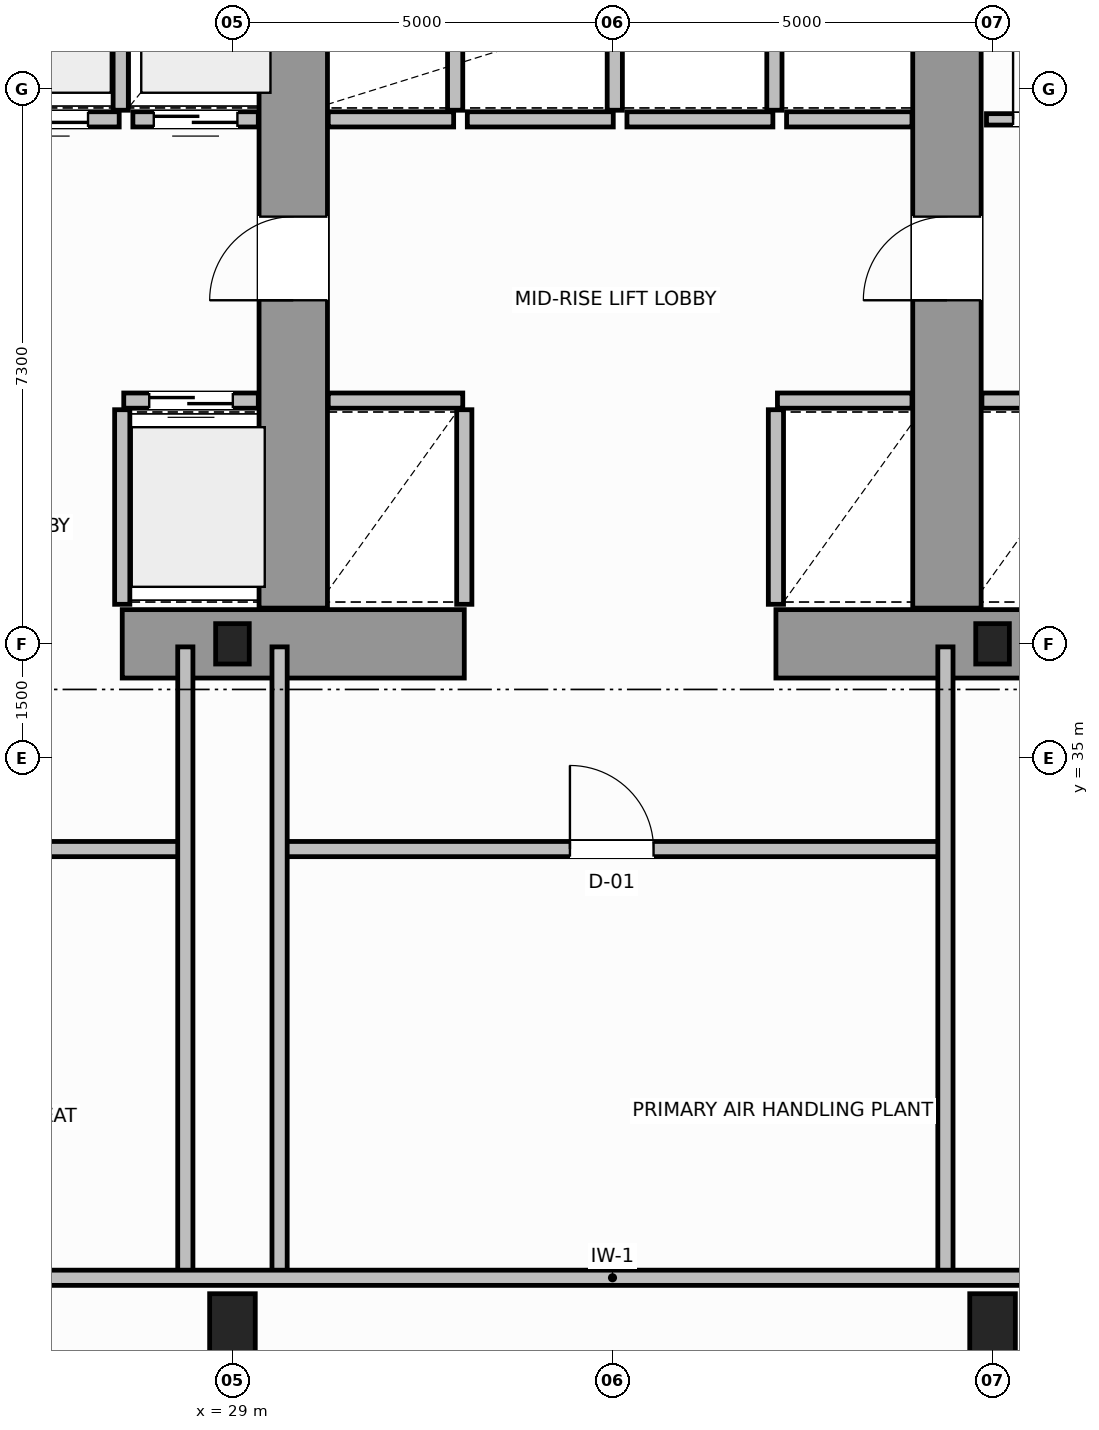
"""IFC4 building model, lengths in metres.
Left out: names, types, materials, properties, quantities, classifications, styles, units other than length and angle.
Written with IfcOpenShell. Run it as: python <this file> out.ifc"""

import sys

from ifc_helpers import new_model, si_unit, direction, frame, frame_2d, origin, origin_2d, place, context, subcontext, project, spatial, rectangle, hollow_rectangle, i_section, extrude, source, transform, mapped, element, fill, save


model = new_model("IFC4")
c1 = context("Model", 3, precision=1e-05, world=origin(), true_north=direction((0.0, 1.0)))
c2 = subcontext(c1, "Body", "Model", "MODEL_VIEW")
j1 = project(units=[si_unit("LENGTHUNIT", "METRE"), si_unit("PLANEANGLEUNIT", "RADIAN")], contexts=[c1])
p1 = place(None, origin())
s1 = spatial("IfcSite", under=j1, at=p1, CompositionType="ELEMENT")
p2 = place(p1, origin())
s2 = spatial("IfcBuilding", under=s1, at=p2, CompositionType="ELEMENT")
p3 = place(p2, frame((0.0, 0.0, 83.4)))
s3 = spatial("IfcBuildingStorey", under=s2, at=p3, CompositionType="ELEMENT", Elevation=83.4)
m1 = source(origin(), c2, "Body", "SweptSolid", [
    extrude(i_section(OverallWidth=0.442, OverallDepth=0.531, WebThickness=0.065, FlangeThickness=0.076, FilletRadius=0.015, at=origin_2d()), origin(), (0.0, 0.0, 1.0), 4.8),
])
for number, where, z_axis, x_axis in (
    (1, (29.0, 36.5, 0.0), (0.0, 0.0, 1.0), (1.0, 0.0, 0.0)),
    (2, (39.0, 36.5, 0.0), (0.0, 0.0, 1.0), (1.0, 0.0, 0.0)),
):
    element("IfcColumn", number, at=place(p3, frame(where, z_axis=z_axis, x_axis=x_axis)), inside=s3, PredefinedType="COLUMN", context=c2, shape_type="MappedRepresentation", body=[
        mapped(m1, transform((0.0, 0.0, 0.0), scale=1.0)),
    ])
m2 = source(origin(), c2, "Body", "SweptSolid", [
    extrude(hollow_rectangle(XDim=0.6, YDim=0.9, WallThickness=0.04, InnerFilletRadius=0.04, OuterFilletRadius=0.08, at=origin_2d()), origin(), (0.0, 0.0, 1.0), 4.8),
])
for number, where, z_axis, x_axis in (
    (3, (29.0, 27.5, 0.0), (0.0, 0.0, 1.0), (1.0, 0.0, 0.0)),
    (4, (39.0, 27.5, 0.0), (0.0, 0.0, 1.0), (1.0, 0.0, 0.0)),
):
    element("IfcColumn", number, at=place(p3, frame(where, z_axis=z_axis, x_axis=x_axis)), inside=s3, PredefinedType="COLUMN", context=c2, shape_type="MappedRepresentation", body=[
        mapped(m2, transform((0.0, 0.0, 0.0), scale=1.0)),
    ])
for number, where, z_axis, x_axis in (
    (5, (27.55, 36.5, 0.0), (0.0, 0.0, 1.0), (1.0, 0.0, 0.0)),
    (6, (36.15, 36.5, 0.0), (0.0, 0.0, 1.0), (1.0, 0.0, 0.0)),
):
    element("IfcWall", number, at=place(p3, frame(where, z_axis=z_axis, x_axis=x_axis)), inside=s3, PredefinedType="SHEAR", context=c2, shape_type="SweptSolid", body=[
        extrude(rectangle(XDim=4.5, YDim=0.9, at=frame_2d((2.25, 0.0))), origin(), (0.0, 0.0, 1.0), 4.8),
    ])
p4 = place(p3, frame((29.8, 36.97, 0.0), z_axis=(0.0, 0.0, 1.0), x_axis=(0.0, 1.0, 0.0)))
e7 = element("IfcWall", 7, at=p4, inside=s3, PredefinedType="SHEAR", context=c2, shape_type="SweptSolid", body=[
    extrude(rectangle(XDim=9.23, YDim=0.9, at=frame_2d((4.615, 0.0))), origin(), (0.0, 0.0, 1.0), 4.8),
])
p5 = place(p4, frame((4.05, 0.0, 0.0)))
e8 = element("IfcOpeningElement", 8, at=p5, cuts=e7, PredefinedType="OPENING", context=c2, shape_type="SweptSolid", body=[
    extrude(rectangle(XDim=1.1, YDim=2.15, at=frame_2d((0.55, 1.075))), frame((0.0, 0.46, 0.0), z_axis=(0.0, -1.0, 0.0), x_axis=(1.0, 0.0, 0.0)), (0.0, 0.0, 1.0), 0.92),
])
p6 = place(p3, frame((38.4, 36.97, 0.0), z_axis=(0.0, 0.0, 1.0), x_axis=(0.0, 1.0, 0.0)))
e9 = element("IfcWall", 9, at=p6, inside=s3, PredefinedType="SHEAR", context=c2, shape_type="SweptSolid", body=[
    extrude(rectangle(XDim=9.23, YDim=0.9, at=frame_2d((4.615, 0.0))), origin(), (0.0, 0.0, 1.0), 4.8),
])
p7 = place(p6, frame((4.05, 0.0, 0.0)))
e10 = element("IfcOpeningElement", 10, at=p7, cuts=e9, PredefinedType="OPENING", context=c2, shape_type="SweptSolid", body=[
    extrude(rectangle(XDim=1.1, YDim=2.15, at=frame_2d((0.55, 1.075))), frame((0.0, 0.46, 0.0), z_axis=(0.0, -1.0, 0.0), x_axis=(1.0, 0.0, 0.0)), (0.0, 0.0, 1.0), 0.92),
])
p8 = place(p3, frame((27.57, 39.7, 0.0), z_axis=(0.0, 0.0, 1.0), x_axis=(1.0, 0.0, 0.0)))
e11 = element("IfcWall", 11, at=p8, inside=s3, PredefinedType="SOLIDWALL", context=c2, shape_type="SweptSolid", body=[
    extrude(rectangle(XDim=1.77, YDim=0.2, at=frame_2d((0.885, 0.0))), origin(), (0.0, 0.0, 1.0), 4.54),
])
p9 = place(p8, frame((0.335, 0.0, 0.0)))
e12 = element("IfcOpeningElement", 12, at=p9, cuts=e11, PredefinedType="OPENING", context=c2, shape_type="SweptSolid", body=[
    extrude(rectangle(XDim=1.1, YDim=2.15, at=frame_2d((0.55, 1.075))), frame((0.0, 0.11, 0.0), z_axis=(0.0, -1.0, 0.0), x_axis=(1.0, 0.0, 0.0)), (0.0, 0.0, 1.0), 0.22),
])
p10 = place(p3, frame((27.55, 37.02, 0.0), z_axis=(0.0, 0.0, 1.0), x_axis=(0.0, 1.0, 0.0)))
e13 = element("IfcWall", 13, at=p10, inside=s3, PredefinedType="SOLIDWALL", context=c2, shape_type="SweptSolid", body=[
    extrude(rectangle(XDim=2.56, YDim=0.2, at=frame_2d((1.28, 0.0))), origin(), (0.0, 0.0, 1.0), 4.54),
])
p11 = place(p3, frame((25.59, 43.4, 0.0), z_axis=(0.0, 0.0, 1.0), x_axis=(1.0, 0.0, 0.0)))
e14 = element("IfcWall", 14, at=p11, inside=s3, PredefinedType="SOLIDWALL", context=c2, shape_type="SweptSolid", body=[
    extrude(rectangle(XDim=1.92, YDim=0.2, at=frame_2d((0.96, 0.0))), origin(), (0.0, 0.0, 1.0), 4.54),
])
p12 = place(p11, frame((0.41, 0.0, 0.0)))
e15 = element("IfcOpeningElement", 15, at=p12, cuts=e14, PredefinedType="OPENING", context=c2, shape_type="SweptSolid", body=[
    extrude(rectangle(XDim=1.1, YDim=2.15, at=frame_2d((0.55, 1.075))), frame((0.0, 0.11, 0.0), z_axis=(0.0, -1.0, 0.0), x_axis=(1.0, 0.0, 0.0)), (0.0, 0.0, 1.0), 0.22),
])
p13 = place(p3, frame((27.53, 43.52, 0.0), z_axis=(0.0, 0.0, 1.0), x_axis=(0.0, 1.0, 0.0)))
e16 = element("IfcWall", 16, at=p13, inside=s3, PredefinedType="SOLIDWALL", context=c2, shape_type="SweptSolid", body=[
    extrude(rectangle(XDim=2.56, YDim=0.2, at=frame_2d((1.28, 0.0))), origin(), (0.0, 0.0, 1.0), 4.54),
])
p14 = place(p3, frame((27.69, 43.4, 0.0), z_axis=(0.0, 0.0, 1.0), x_axis=(1.0, 0.0, 0.0)))
e17 = element("IfcWall", 17, at=p14, inside=s3, PredefinedType="SOLIDWALL", context=c2, shape_type="SweptSolid", body=[
    extrude(rectangle(XDim=1.65, YDim=0.2, at=frame_2d((0.825, 0.0))), origin(), (0.0, 0.0, 1.0), 4.54),
])
p15 = place(p14, frame((0.275, 0.0, 0.0)))
e18 = element("IfcOpeningElement", 18, at=p15, cuts=e17, PredefinedType="OPENING", context=c2, shape_type="SweptSolid", body=[
    extrude(rectangle(XDim=1.1, YDim=2.15, at=frame_2d((0.55, 1.075))), frame((0.0, 0.11, 0.0), z_axis=(0.0, -1.0, 0.0), x_axis=(1.0, 0.0, 0.0)), (0.0, 0.0, 1.0), 0.22),
])
p16 = place(p3, frame((30.26, 39.7, 0.0), z_axis=(0.0, 0.0, 1.0), x_axis=(1.0, 0.0, 0.0)))
e19 = element("IfcWall", 19, at=p16, inside=s3, PredefinedType="SOLIDWALL", context=c2, shape_type="SweptSolid", body=[
    extrude(rectangle(XDim=1.77, YDim=0.2, at=frame_2d((0.885, 0.0))), origin(), (0.0, 0.0, 1.0), 4.54),
])
p17 = place(p3, frame((32.05, 37.02, 0.0), z_axis=(0.0, 0.0, 1.0), x_axis=(0.0, 1.0, 0.0)))
e20 = element("IfcWall", 20, at=p17, inside=s3, PredefinedType="SOLIDWALL", context=c2, shape_type="SweptSolid", body=[
    extrude(rectangle(XDim=2.56, YDim=0.2, at=frame_2d((1.28, 0.0))), origin(), (0.0, 0.0, 1.0), 4.54),
])
p18 = place(p3, frame((36.17, 39.7, 0.0), z_axis=(0.0, 0.0, 1.0), x_axis=(1.0, 0.0, 0.0)))
e21 = element("IfcWall", 21, at=p18, inside=s3, PredefinedType="SOLIDWALL", context=c2, shape_type="SweptSolid", body=[
    extrude(rectangle(XDim=1.77, YDim=0.2, at=frame_2d((0.885, 0.0))), origin(), (0.0, 0.0, 1.0), 4.54),
])
p19 = place(p3, frame((36.15, 37.02, 0.0), z_axis=(0.0, 0.0, 1.0), x_axis=(0.0, 1.0, 0.0)))
e22 = element("IfcWall", 22, at=p19, inside=s3, PredefinedType="SOLIDWALL", context=c2, shape_type="SweptSolid", body=[
    extrude(rectangle(XDim=2.56, YDim=0.2, at=frame_2d((1.28, 0.0))), origin(), (0.0, 0.0, 1.0), 4.54),
])
p20 = place(p3, frame((30.26, 43.4, 0.0), z_axis=(0.0, 0.0, 1.0), x_axis=(1.0, 0.0, 0.0)))
e23 = element("IfcWall", 23, at=p20, inside=s3, PredefinedType="SOLIDWALL", context=c2, shape_type="SweptSolid", body=[
    extrude(rectangle(XDim=1.65, YDim=0.2, at=frame_2d((0.825, 0.0))), origin(), (0.0, 0.0, 1.0), 4.54),
])
p21 = place(p3, frame((31.93, 43.52, 0.0), z_axis=(0.0, 0.0, 1.0), x_axis=(0.0, 1.0, 0.0)))
e24 = element("IfcWall", 24, at=p21, inside=s3, PredefinedType="SOLIDWALL", context=c2, shape_type="SweptSolid", body=[
    extrude(rectangle(XDim=2.56, YDim=0.2, at=frame_2d((1.28, 0.0))), origin(), (0.0, 0.0, 1.0), 4.54),
])
p22 = place(p3, frame((32.09, 43.4, 0.0), z_axis=(0.0, 0.0, 1.0), x_axis=(1.0, 0.0, 0.0)))
e25 = element("IfcWall", 25, at=p22, inside=s3, PredefinedType="SOLIDWALL", context=c2, shape_type="SweptSolid", body=[
    extrude(rectangle(XDim=1.92, YDim=0.2, at=frame_2d((0.96, 0.0))), origin(), (0.0, 0.0, 1.0), 4.54),
])
p23 = place(p3, frame((34.03, 43.52, 0.0), z_axis=(0.0, 0.0, 1.0), x_axis=(0.0, 1.0, 0.0)))
e26 = element("IfcWall", 26, at=p23, inside=s3, PredefinedType="SOLIDWALL", context=c2, shape_type="SweptSolid", body=[
    extrude(rectangle(XDim=2.56, YDim=0.2, at=frame_2d((1.28, 0.0))), origin(), (0.0, 0.0, 1.0), 4.54),
])
p24 = place(p3, frame((34.19, 43.4, 0.0), z_axis=(0.0, 0.0, 1.0), x_axis=(1.0, 0.0, 0.0)))
e27 = element("IfcWall", 27, at=p24, inside=s3, PredefinedType="SOLIDWALL", context=c2, shape_type="SweptSolid", body=[
    extrude(rectangle(XDim=1.92, YDim=0.2, at=frame_2d((0.96, 0.0))), origin(), (0.0, 0.0, 1.0), 4.54),
])
p25 = place(p3, frame((36.13, 43.52, 0.0), z_axis=(0.0, 0.0, 1.0), x_axis=(0.0, 1.0, 0.0)))
e28 = element("IfcWall", 28, at=p25, inside=s3, PredefinedType="SOLIDWALL", context=c2, shape_type="SweptSolid", body=[
    extrude(rectangle(XDim=2.56, YDim=0.2, at=frame_2d((1.28, 0.0))), origin(), (0.0, 0.0, 1.0), 4.54),
])
p26 = place(p3, frame((36.29, 43.4, 0.0), z_axis=(0.0, 0.0, 1.0), x_axis=(1.0, 0.0, 0.0)))
e29 = element("IfcWall", 29, at=p26, inside=s3, PredefinedType="SOLIDWALL", context=c2, shape_type="SweptSolid", body=[
    extrude(rectangle(XDim=1.65, YDim=0.2, at=frame_2d((0.825, 0.0))), origin(), (0.0, 0.0, 1.0), 4.54),
])
p27 = place(p3, frame((38.86, 39.7, 0.0), z_axis=(0.0, 0.0, 1.0), x_axis=(1.0, 0.0, 0.0)))
e30 = element("IfcWall", 30, at=p27, inside=s3, PredefinedType="SOLIDWALL", context=c2, shape_type="SweptSolid", body=[
    extrude(rectangle(XDim=1.77, YDim=0.2, at=frame_2d((0.885, 0.0))), origin(), (0.0, 0.0, 1.0), 4.54),
])
p28 = place(p3, frame((38.92, 43.4, 0.0), z_axis=(0.0, 0.0, 1.0), x_axis=(1.0, 0.0, 0.0)))
e31 = element("IfcWall", 31, at=p28, inside=s3, PredefinedType="PARTITIONING", context=c2, shape_type="SweptSolid", body=[
    extrude(rectangle(XDim=1.6, YDim=0.15, at=frame_2d((0.8, 0.0))), origin(), (0.0, 0.0, 1.0), 4.54),
])
p29 = place(p28, frame((0.35, 0.0, 0.0)))
e32 = element("IfcOpeningElement", 32, at=p29, cuts=e31, PredefinedType="OPENING", context=c2, shape_type="SweptSolid", body=[
    extrude(rectangle(XDim=0.9, YDim=2.1, at=frame_2d((0.45, 1.05))), frame((0.0, 0.085, 0.0), z_axis=(0.0, -1.0, 0.0), x_axis=(1.0, 0.0, 0.0)), (0.0, 0.0, 1.0), 0.17),
])
p30 = place(p3, frame((17.45, 33.8, 0.0), z_axis=(0.0, 0.0, 1.0), x_axis=(1.0, 0.0, 0.0)))
e33 = element("IfcWall", 33, at=p30, inside=s3, PredefinedType="SOLIDWALL", context=c2, shape_type="SweptSolid", body=[
    extrude(rectangle(XDim=10.91, YDim=0.2, at=frame_2d((5.455, 0.0))), origin(), (0.0, 0.0, 1.0), 4.03),
])
p31 = place(p30, frame((8.01, 0.0, 0.0)))
e34 = element("IfcOpeningElement", 34, at=p31, cuts=e33, PredefinedType="OPENING", context=c2, shape_type="SweptSolid", body=[
    extrude(rectangle(XDim=1.1, YDim=2.15, at=frame_2d((0.55, 1.075))), frame((0.0, 0.11, 0.0), z_axis=(0.0, -1.0, 0.0), x_axis=(1.0, 0.0, 0.0)), (0.0, 0.0, 1.0), 0.22),
])
p32 = place(p3, frame((29.64, 33.8, 0.0), z_axis=(0.0, 0.0, 1.0), x_axis=(1.0, 0.0, 0.0)))
e35 = element("IfcWall", 35, at=p32, inside=s3, PredefinedType="SOLIDWALL", context=c2, shape_type="SweptSolid", body=[
    extrude(rectangle(XDim=8.72, YDim=0.2, at=frame_2d((4.36, 0.0))), origin(), (0.0, 0.0, 1.0), 4.03),
])
p33 = place(p32, frame((3.8, 0.0, 0.0)))
e36 = element("IfcOpeningElement", 36, at=p33, cuts=e35, PredefinedType="OPENING", context=c2, shape_type="SweptSolid", body=[
    extrude(rectangle(XDim=1.1, YDim=2.15, at=frame_2d((0.55, 1.075))), frame((0.0, 0.11, 0.0), z_axis=(0.0, -1.0, 0.0), x_axis=(1.0, 0.0, 0.0)), (0.0, 0.0, 1.0), 0.22),
])
for number, where, z_axis, x_axis in (
    (37, (28.38, 28.16, 0.0), (0.0, 0.0, 1.0), (0.0, 1.0, 0.0)),
    (38, (29.62, 28.16, 0.0), (0.0, 0.0, 1.0), (0.0, 1.0, 0.0)),
    (39, (38.38, 28.16, 0.0), (0.0, 0.0, 1.0), (0.0, 1.0, 0.0)),
):
    element("IfcWall", number, at=place(p3, frame(where, z_axis=z_axis, x_axis=x_axis)), inside=s3, PredefinedType="SOLIDWALL", context=c2, shape_type="SweptSolid", body=[
        extrude(rectangle(XDim=8.3, YDim=0.2, at=frame_2d((4.15, 0.0))), origin(), (0.0, 0.0, 1.0), 4.54),
    ])
p34 = place(p3, frame((17.48, 28.16, 0.0), z_axis=(0.0, 0.0, 1.0), x_axis=(1.0, 0.0, 0.0)))
e40 = element("IfcWall", 40, at=p34, inside=s3, PredefinedType="SOLIDWALL", context=c2, shape_type="SweptSolid", body=[
    extrude(rectangle(XDim=33.04, YDim=0.2, at=frame_2d((16.52, 0.0))), origin(), (0.0, 0.0, 1.0), 4.54),
])
m3 = source(origin(), c2, "Body", "SweptSolid", [
    extrude(rectangle(XDim=1.1, YDim=2.15, at=frame_2d((0.55, 1.075))), frame((0.0, 0.025, 0.0), z_axis=(0.0, -1.0, 0.0), x_axis=(1.0, 0.0, 0.0)), (0.0, 0.0, 1.0), 0.05),
])
p35 = place(p9, origin())
e41 = element("IfcDoor", 41, at=p35, inside=s3, OperationType="DOUBLE_DOOR_SLIDING", PredefinedType="DOOR", context=c2, shape_type="MappedRepresentation", body=[
    mapped(m3, transform((0.0, 0.0, 0.0), scale=1.0)),
])
fill(e12, e41)
p36 = place(p12, origin())
e42 = element("IfcDoor", 42, at=p36, inside=s3, OperationType="DOUBLE_DOOR_SLIDING", PredefinedType="DOOR", context=c2, shape_type="MappedRepresentation", body=[
    mapped(m3, transform((0.0, 0.0, 0.0), scale=1.0)),
])
fill(e15, e42)
p37 = place(p15, origin())
e43 = element("IfcDoor", 43, at=p37, inside=s3, OperationType="DOUBLE_DOOR_SLIDING", PredefinedType="DOOR", context=c2, shape_type="MappedRepresentation", body=[
    mapped(m3, transform((0.0, 0.0, 0.0), scale=1.0)),
])
fill(e18, e43)
p38 = place(p5, origin())
e44 = element("IfcDoor", 44, at=p38, inside=s3, OperationType="SINGLE_SWING_LEFT", PredefinedType="DOOR", context=c2, shape_type="MappedRepresentation", body=[
    mapped(m3, transform((0.0, 0.0, 0.0), scale=1.0)),
])
fill(e8, e44)
p39 = place(p7, origin())
e45 = element("IfcDoor", 45, at=p39, inside=s3, OperationType="SINGLE_SWING_RIGHT", PredefinedType="DOOR", context=c2, shape_type="MappedRepresentation", body=[
    mapped(m3, transform((0.0, 0.0, 0.0), scale=1.0)),
])
fill(e10, e45)
m4 = source(origin(), c2, "Body", "SweptSolid", [
    extrude(rectangle(XDim=0.9, YDim=2.1, at=frame_2d((0.45, 1.05))), frame((0.0, 0.025, 0.0), z_axis=(0.0, -1.0, 0.0), x_axis=(1.0, 0.0, 0.0)), (0.0, 0.0, 1.0), 0.05),
])
p40 = place(p29, origin())
e46 = element("IfcDoor", 46, at=p40, inside=s3, OperationType="SINGLE_SWING_LEFT", PredefinedType="DOOR", context=c2, shape_type="MappedRepresentation", body=[
    mapped(m4, transform((0.0, 0.0, 0.0), scale=1.0)),
])
fill(e32, e46)
p41 = place(p33, origin())
e47 = element("IfcDoor", 47, at=p41, inside=s3, OperationType="SINGLE_SWING_RIGHT", PredefinedType="DOOR", context=c2, shape_type="MappedRepresentation", body=[
    mapped(m3, transform((0.0, 0.0, 0.0), scale=1.0)),
])
fill(e36, e47)
save(model, sys.argv[1])
